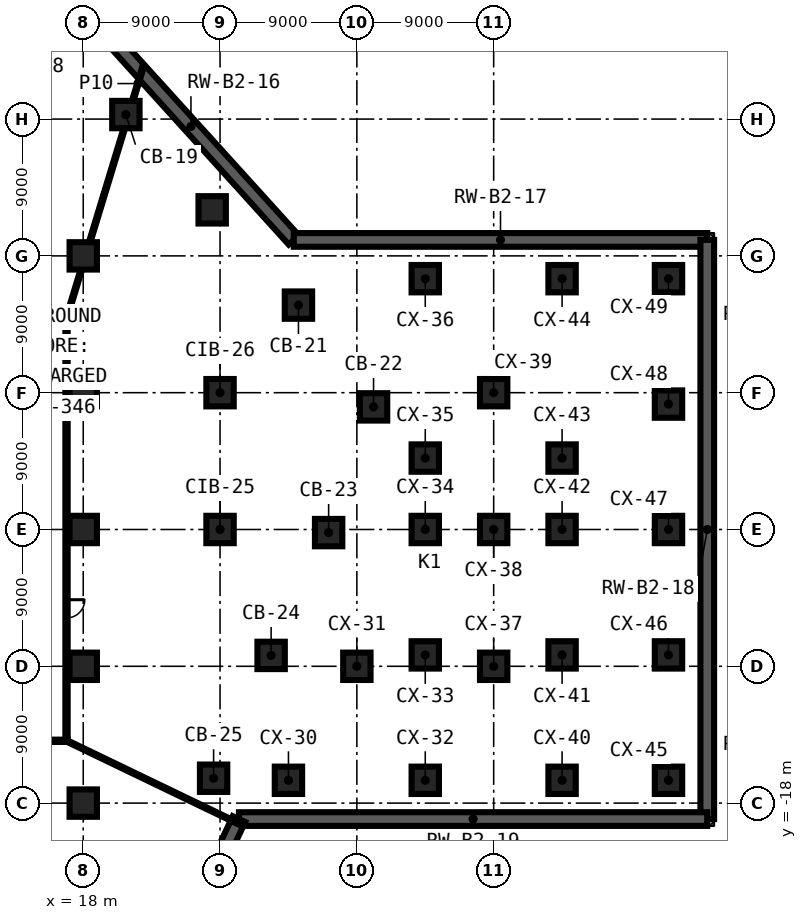
"""IFC4 building model, lengths in metres.
Left out: names, types, materials, properties, quantities, classifications, styles, units other than length and angle.
Written with IfcOpenShell. Run it as: python <this file> out.ifc"""

import sys

from ifc_helpers import new_model, si_unit, direction, frame, frame_2d, origin, origin_2d, place, context, subcontext, project, spatial, rectangle, extrude, element, fill, save


model = new_model("IFC4")
c1 = context("Model", 3, precision=1e-05, world=origin(), true_north=direction((0.0, 1.0)))
c2 = subcontext(c1, "Body", "Model", "MODEL_VIEW")
j1 = project(units=[si_unit("LENGTHUNIT", "METRE"), si_unit("PLANEANGLEUNIT", "RADIAN")], contexts=[c1])
p1 = place(None, origin())
s1 = spatial("IfcSite", under=j1, at=p1, CompositionType="ELEMENT")
p2 = place(p1, origin())
s2 = spatial("IfcBuilding", under=s1, at=p2, CompositionType="ELEMENT")
p3 = place(p2, frame((0.0, 0.0, -11.5)))
s3 = spatial("IfcBuildingStorey", under=s2, at=p3, CompositionType="ELEMENT", Elevation=-11.5)
for number, where, z_axis, x_axis in (
    (1, (20.805, 27.297, 0.0), (0.0, 0.0, 1.0), (1.0, 0.0, 0.0)),
    (2, (26.482, 21.029, 0.0), (0.0, 0.0, 1.0), (1.0, 0.0, 0.0)),
    (3, (32.158, 14.761, 0.0), (0.0, 0.0, 1.0), (1.0, 0.0, 0.0)),
    (4, (37.098, 8.066, 0.0), (0.0, 0.0, 1.0), (1.0, 0.0, 0.0)),
    (5, (34.143, -0.205, 0.0), (0.0, 0.0, 1.0), (1.0, 0.0, 0.0)),
    (6, (30.36, -8.284, 0.0), (0.0, 0.0, 1.0), (1.0, 0.0, 0.0)),
    (7, (26.576, -16.364, 0.0), (0.0, 0.0, 1.0), (1.0, 0.0, 0.0)),
    (8, (18.0, -18.0, 0.0), (0.0, 0.0, 1.0), (1.0, 0.0, 0.0)),
    (9, (18.0, -9.0, 0.0), (0.0, 0.0, 1.0), (1.0, 0.0, 0.0)),
    (10, (18.0, 0.0, 0.0), (0.0, 0.0, 1.0), (1.0, 0.0, 0.0)),
    (11, (18.0, 9.0, 0.0), (0.0, 0.0, 1.0), (1.0, 0.0, 0.0)),
    (12, (18.0, 18.0, 0.0), (0.0, 0.0, 1.0), (1.0, 0.0, 0.0)),
    (13, (27.0, 0.0, 0.0), (0.0, 0.0, 1.0), (1.0, 0.0, 0.0)),
    (14, (27.0, 9.0, 0.0), (0.0, 0.0, 1.0), (1.0, 0.0, 0.0)),
    (15, (31.5, -16.5, 0.0), (0.0, 0.0, 1.0), (1.0, 0.0, 0.0)),
    (16, (36.0, -9.0, 0.0), (0.0, 0.0, 1.0), (1.0, 0.0, 0.0)),
    (17, (40.5, -16.5, 0.0), (0.0, 0.0, 1.0), (1.0, 0.0, 0.0)),
    (18, (40.5, -8.25, 0.0), (0.0, 0.0, 1.0), (1.0, 0.0, 0.0)),
    (19, (40.5, 0.0, 0.0), (0.0, 0.0, 1.0), (1.0, 0.0, 0.0)),
    (20, (40.5, 4.7, 0.0), (0.0, 0.0, 1.0), (1.0, 0.0, 0.0)),
    (21, (40.5, 16.5, 0.0), (0.0, 0.0, 1.0), (1.0, 0.0, 0.0)),
    (22, (45.0, -9.0, 0.0), (0.0, 0.0, 1.0), (1.0, 0.0, 0.0)),
    (23, (45.0, 0.0, 0.0), (0.0, 0.0, 1.0), (1.0, 0.0, 0.0)),
    (24, (45.0, 9.0, 0.0), (0.0, 0.0, 1.0), (1.0, 0.0, 0.0)),
    (25, (49.5, -16.5, 0.0), (0.0, 0.0, 1.0), (1.0, 0.0, 0.0)),
    (26, (49.5, -8.25, 0.0), (0.0, 0.0, 1.0), (1.0, 0.0, 0.0)),
    (27, (49.5, 0.0, 0.0), (0.0, 0.0, 1.0), (1.0, 0.0, 0.0)),
    (28, (49.5, 4.7, 0.0), (0.0, 0.0, 1.0), (1.0, 0.0, 0.0)),
    (29, (49.5, 16.5, 0.0), (0.0, 0.0, 1.0), (1.0, 0.0, 0.0)),
    (30, (56.5, -16.5, 0.0), (0.0, 0.0, 1.0), (1.0, 0.0, 0.0)),
    (31, (56.5, -8.25, 0.0), (0.0, 0.0, 1.0), (1.0, 0.0, 0.0)),
    (32, (56.5, 0.0, 0.0), (0.0, 0.0, 1.0), (1.0, 0.0, 0.0)),
    (33, (56.5, 8.25, 0.0), (0.0, 0.0, 1.0), (1.0, 0.0, 0.0)),
    (34, (56.5, 16.5, 0.0), (0.0, 0.0, 1.0), (1.0, 0.0, 0.0)),
):
    element("IfcColumn", number, at=place(p3, frame(where, z_axis=z_axis, x_axis=x_axis)), inside=s3, PredefinedType="COLUMN", context=c2, shape_type="SweptSolid", body=[
        extrude(rectangle(XDim=1.8, YDim=1.8, at=origin_2d()), origin(), (0.0, 0.0, 1.0), 5.1),
    ])
p4 = place(p3, frame((18.323, 33.986, 0.0), z_axis=(0.0, 0.0, 1.0), x_axis=(0.671255569768, -0.741225984471, 0.0)))
e35 = element("IfcWall", 35, at=p4, inside=s3, PredefinedType="SHEAR", context=c2, shape_type="SweptSolid", body=[
    extrude(rectangle(XDim=20.15, YDim=0.9, at=frame_2d((10.075, 0.0))), origin(), (0.0, 0.0, 1.0), 5.1),
])
p5 = place(p3, frame((31.848, 19.05, 0.0), z_axis=(0.0, 0.0, 1.0), x_axis=(1.0, 0.0, 0.0)))
e36 = element("IfcWall", 36, at=p5, inside=s3, PredefinedType="SHEAR", context=c2, shape_type="SweptSolid", body=[
    extrude(rectangle(XDim=27.202, YDim=0.9, at=frame_2d((13.601, 0.0))), origin(), (0.0, 0.0, 1.0), 5.1),
])
p6 = place(p3, frame((59.05, 19.05, 0.0), z_axis=(0.0, 0.0, 1.0), x_axis=(0.0, -1.0, 0.0)))
e37 = element("IfcWall", 37, at=p6, inside=s3, PredefinedType="SHEAR", context=c2, shape_type="SweptSolid", body=[
    extrude(rectangle(XDim=38.1, YDim=0.9, at=frame_2d((19.05, 0.0))), origin(), (0.0, 0.0, 1.0), 5.1),
])
p7 = place(p3, frame((59.05, -19.05, 0.0), z_axis=(0.0, 0.0, 1.0), x_axis=(-1.0, 0.0, 0.0)))
e38 = element("IfcWall", 38, at=p7, inside=s3, PredefinedType="SHEAR", context=c2, shape_type="SweptSolid", body=[
    extrude(rectangle(XDim=30.806, YDim=0.9, at=frame_2d((15.403, 0.0))), origin(), (0.0, 0.0, 1.0), 5.1),
])
p8 = place(p3, frame((28.244, -19.05, 0.0), z_axis=(0.0, 0.0, 1.0), x_axis=(-0.424123010069, -0.905604589393, 0.0)))
e39 = element("IfcWall", 39, at=p8, inside=s3, PredefinedType="SHEAR", context=c2, shape_type="SweptSolid", body=[
    extrude(rectangle(XDim=13.744, YDim=0.9, at=frame_2d((6.872, 0.0))), origin(), (0.0, 0.0, 1.0), 5.1),
])
p9 = place(p3, frame((16.975, -13.9, 0.0), z_axis=(0.0, 0.0, 1.0), x_axis=(-1.0, 0.0, 0.0)))
e40 = element("IfcWall", 40, at=p9, inside=s3, PredefinedType="PARTITIONING", context=c2, shape_type="SweptSolid", body=[
    extrude(rectangle(XDim=33.95, YDim=0.15, at=frame_2d((16.975, 0.0))), origin(), (0.0, 0.0, 1.0), 5.1),
])
p10 = place(p9, frame((28.375, 0.0, 0.0)))
e41 = element("IfcOpeningElement", 41, at=p10, cuts=e40, PredefinedType="OPENING", context=c2, shape_type="SweptSolid", body=[
    extrude(rectangle(XDim=1.2, YDim=2.1, at=frame_2d((0.6, 1.05))), frame((0.0, 0.085, 0.0), z_axis=(0.0, -1.0, 0.0), x_axis=(1.0, 0.0, 0.0)), (0.0, 0.0, 1.0), 0.17),
])
p11 = place(p9, frame((15.475, 0.0, 0.0)))
e42 = element("IfcOpeningElement", 42, at=p11, cuts=e40, PredefinedType="OPENING", context=c2, shape_type="SweptSolid", body=[
    extrude(rectangle(XDim=1.2, YDim=2.1, at=frame_2d((0.6, 1.05))), frame((0.0, 0.085, 0.0), z_axis=(0.0, -1.0, 0.0), x_axis=(1.0, 0.0, 0.0)), (0.0, 0.0, 1.0), 0.17),
])
p12 = place(p3, frame((-16.975, 13.9, 0.0), z_axis=(0.0, 0.0, 1.0), x_axis=(1.0, 0.0, 0.0)))
e43 = element("IfcWall", 43, at=p12, inside=s3, PredefinedType="PARTITIONING", context=c2, shape_type="SweptSolid", body=[
    extrude(rectangle(XDim=33.95, YDim=0.15, at=frame_2d((16.975, 0.0))), origin(), (0.0, 0.0, 1.0), 5.1),
])
p13 = place(p12, frame((9.887, 0.0, 0.0)))
e44 = element("IfcOpeningElement", 44, at=p13, cuts=e43, PredefinedType="OPENING", context=c2, shape_type="SweptSolid", body=[
    extrude(rectangle(XDim=1.2, YDim=2.1, at=frame_2d((0.6, 1.05))), frame((0.0, 0.085, 0.0), z_axis=(0.0, -1.0, 0.0), x_axis=(1.0, 0.0, 0.0)), (0.0, 0.0, 1.0), 0.17),
])
p14 = place(p3, frame((16.9, 13.9, 0.0), z_axis=(0.0, 0.0, 1.0), x_axis=(0.291202273884, 0.95666150528, 0.0)))
e45 = element("IfcWall", 45, at=p14, inside=s3, PredefinedType="PARTITIONING", context=c2, shape_type="SweptSolid", body=[
    extrude(rectangle(XDim=3.345, YDim=0.1, at=frame_2d((1.673, 0.0))), origin(), (0.0, 0.0, 1.0), 5.1),
])
p15 = place(p3, frame((18.422, 18.9, 0.0), z_axis=(0.0, 0.0, 1.0), x_axis=(0.291192607523, 0.956664447611, 0.0)))
e46 = element("IfcWall", 46, at=p15, inside=s3, PredefinedType="PARTITIONING", context=c2, shape_type="SweptSolid", body=[
    extrude(rectangle(XDim=7.837, YDim=0.1, at=frame_2d((3.918, 0.0))), origin(), (0.0, 0.0, 1.0), 5.1),
])
p16 = place(p3, frame((21.252, 28.197, 0.0), z_axis=(0.0, 0.0, 1.0), x_axis=(0.291210561393, 0.956658982571, 0.0)))
e47 = element("IfcWall", 47, at=p16, inside=s3, PredefinedType="PARTITIONING", context=c2, shape_type="SweptSolid", body=[
    extrude(rectangle(XDim=2.382, YDim=0.1, at=frame_2d((1.191, 0.0))), origin(), (0.0, 0.0, 1.0), 5.1),
])
p17 = place(p3, frame((16.9, 13.825, 0.0), z_axis=(0.0, 0.0, 1.0), x_axis=(0.0, -1.0, 0.0)))
e48 = element("IfcWall", 48, at=p17, inside=s3, PredefinedType="PARTITIONING", context=c2, shape_type="SweptSolid", body=[
    extrude(rectangle(XDim=27.65, YDim=0.15, at=frame_2d((13.825, 0.0))), origin(), (0.0, 0.0, 1.0), 5.1),
])
p18 = place(p17, frame((18.445, 0.0, 0.0)))
e49 = element("IfcOpeningElement", 49, at=p18, cuts=e48, PredefinedType="OPENING", context=c2, shape_type="SweptSolid", body=[
    extrude(rectangle(XDim=1.2, YDim=2.1, at=frame_2d((0.6, 1.05))), frame((0.0, 0.085, 0.0), z_axis=(0.0, -1.0, 0.0), x_axis=(1.0, 0.0, 0.0)), (0.0, 0.0, 1.0), 0.17),
])
p19 = place(p3, frame((16.9, -13.9, 0.0), z_axis=(0.0, 0.0, 1.0), x_axis=(0.901001946138, -0.433815044754, 0.0)))
e50 = element("IfcWall", 50, at=p19, inside=s3, PredefinedType="PARTITIONING", context=c2, shape_type="SweptSolid", body=[
    extrude(rectangle(XDim=12.788, YDim=0.1, at=frame_2d((6.394, 0.0))), origin(), (0.0, 0.0, 1.0), 5.1),
])
p20 = place(p18, origin())
e51 = element("IfcDoor", 51, at=p20, inside=s3, OperationType="SINGLE_SWING_LEFT", PredefinedType="DOOR", context=c2, shape_type="SweptSolid", body=[
    extrude(rectangle(XDim=1.2, YDim=2.1, at=frame_2d((0.6, 1.05))), frame((0.0, 0.025, 0.0), z_axis=(0.0, -1.0, 0.0), x_axis=(1.0, 0.0, 0.0)), (0.0, 0.0, 1.0), 0.05),
])
fill(e49, e51)
save(model, sys.argv[1])
